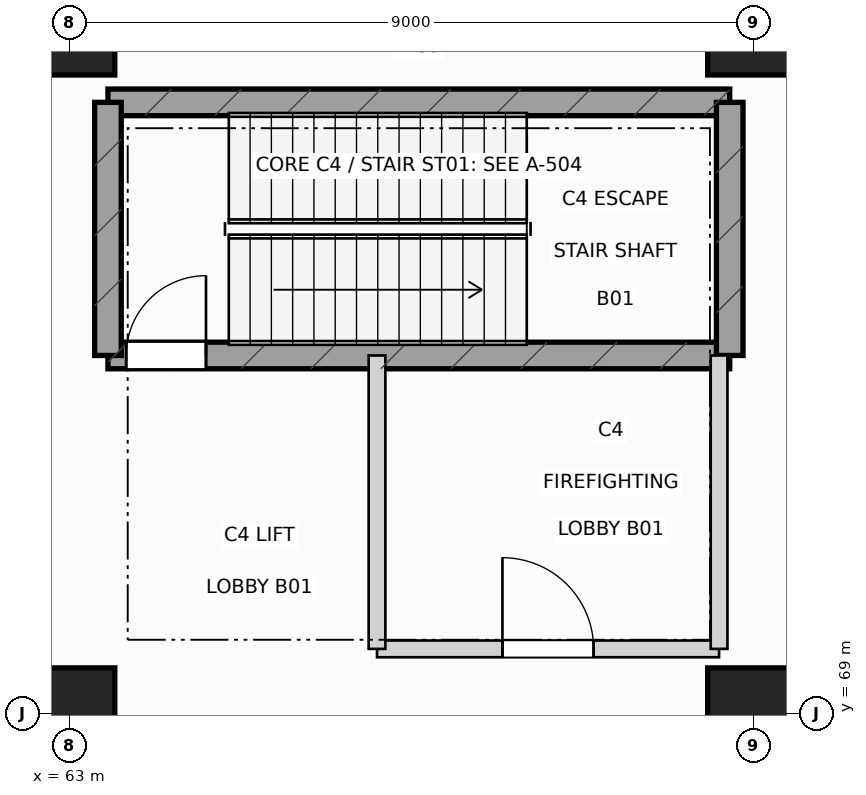
"""IFC4 building model, lengths in metres.
Left out: names, types, materials, properties, quantities, classifications, styles, units other than length and angle.
Written with IfcOpenShell. Run it as: python <this file> out.ifc"""

import sys

from ifc_helpers import new_model, si_unit, direction, frame, frame_2d, origin, origin_2d, place, context, subcontext, project, spatial, rectangle, extrude, element, fill, save


model = new_model("IFC4")
c1 = context("Model", 3, precision=1e-05, world=origin(), true_north=direction((0.0, 1.0)))
c2 = subcontext(c1, "Body", "Model", "MODEL_VIEW")
j1 = project(units=[si_unit("LENGTHUNIT", "METRE"), si_unit("PLANEANGLEUNIT", "RADIAN")], contexts=[c1])
p1 = place(None, origin())
s1 = spatial("IfcSite", under=j1, at=p1, CompositionType="ELEMENT")
p2 = place(p1, origin())
s2 = spatial("IfcBuilding", under=s1, at=p2, CompositionType="ELEMENT")
p3 = place(p2, frame((0.0, 0.0, -5.4)))
s3 = spatial("IfcBuildingStorey", under=s2, at=p3, CompositionType="ELEMENT", Elevation=-5.4)
for number, where, z_axis, x_axis in (
    (1, (63.0, 69.0, 0.0), (0.0, 0.0, 1.0), (1.0, 0.0, 0.0)),
    (2, (63.0, 78.0, 0.0), (0.0, 0.0, 1.0), (1.0, 0.0, 0.0)),
    (3, (72.0, 69.0, 0.0), (0.0, 0.0, 1.0), (1.0, 0.0, 0.0)),
    (4, (72.0, 78.0, 0.0), (0.0, 0.0, 1.0), (1.0, 0.0, 0.0)),
):
    element("IfcColumn", number, at=place(p3, frame(where, z_axis=z_axis, x_axis=x_axis)), inside=s3, PredefinedType="COLUMN", context=c2, shape_type="SweptSolid", body=[
        extrude(rectangle(XDim=1.2, YDim=1.2, at=origin_2d()), origin(), (0.0, 0.0, 1.0), 5.4),
    ])
p4 = place(p3, frame((63.51, 73.71, 0.0), z_axis=(0.0, 0.0, 1.0), x_axis=(1.0, 0.0, 0.0)))
e5 = element("IfcWall", 5, at=p4, inside=s3, PredefinedType="SHEAR", context=c2, shape_type="SweptSolid", body=[
    extrude(rectangle(XDim=8.18, YDim=0.35, at=frame_2d((4.09, 0.0))), origin(), (0.0, 0.0, 1.0), 5.08),
])
p5 = place(p4, frame((0.24, 0.0, 0.0)))
e6 = element("IfcOpeningElement", 6, at=p5, cuts=e5, PredefinedType="OPENING", context=c2, shape_type="SweptSolid", body=[
    extrude(rectangle(XDim=1.05, YDim=2.18, at=frame_2d((0.525, 1.09))), frame((0.0, 0.185, 0.0), z_axis=(0.0, -1.0, 0.0), x_axis=(1.0, 0.0, 0.0)), (0.0, 0.0, 1.0), 0.37),
])
p6 = place(p3, frame((63.51, 77.04, 0.0), z_axis=(0.0, 0.0, 1.0), x_axis=(1.0, 0.0, 0.0)))
e7 = element("IfcWall", 7, at=p6, inside=s3, PredefinedType="SHEAR", context=c2, shape_type="SweptSolid", body=[
    extrude(rectangle(XDim=8.18, YDim=0.35, at=frame_2d((4.09, 0.0))), origin(), (0.0, 0.0, 1.0), 5.08),
])
for number, where, z_axis, x_axis in (
    (8, (63.51, 73.71, 0.0), (0.0, 0.0, 1.0), (0.0, 1.0, 0.0)),
    (9, (71.69, 73.71, 0.0), (0.0, 0.0, 1.0), (0.0, 1.0, 0.0)),
):
    element("IfcWall", number, at=place(p3, frame(where, z_axis=z_axis, x_axis=x_axis)), inside=s3, PredefinedType="SHEAR", context=c2, shape_type="SweptSolid", body=[
        extrude(rectangle(XDim=3.33, YDim=0.35, at=frame_2d((1.665, 0.0))), origin(), (0.0, 0.0, 1.0), 5.08),
    ])
p7 = place(p3, frame((67.05, 69.85, 0.0), z_axis=(0.0, 0.0, 1.0), x_axis=(1.0, 0.0, 0.0)))
e10 = element("IfcWall", 10, at=p7, inside=s3, PredefinedType="PARTITIONING", context=c2, shape_type="SweptSolid", body=[
    extrude(rectangle(XDim=4.5, YDim=0.22, at=frame_2d((2.25, 0.0))), origin(), (0.0, 0.0, 1.0), 4.555),
])
p8 = place(p7, frame((1.65, 0.0, 0.0)))
e11 = element("IfcOpeningElement", 11, at=p8, cuts=e10, PredefinedType="OPENING", context=c2, shape_type="SweptSolid", body=[
    extrude(rectangle(XDim=1.2, YDim=2.18, at=frame_2d((0.6, 1.09))), frame((0.0, 0.12, 0.0), z_axis=(0.0, -1.0, 0.0), x_axis=(1.0, 0.0, 0.0)), (0.0, 0.0, 1.0), 0.24),
])
p9 = place(p3, frame((67.05, 69.85, 0.0), z_axis=(0.0, 0.0, 1.0), x_axis=(0.0, 1.0, 0.0)))
e12 = element("IfcWall", 12, at=p9, inside=s3, PredefinedType="PARTITIONING", context=c2, shape_type="SweptSolid", body=[
    extrude(rectangle(XDim=3.86, YDim=0.22, at=frame_2d((1.93, 0.0))), origin(), (0.0, 0.0, 1.0), 4.685),
])
p10 = place(p3, frame((71.55, 69.85, 0.0), z_axis=(0.0, 0.0, 1.0), x_axis=(0.0, 1.0, 0.0)))
e13 = element("IfcWall", 13, at=p10, inside=s3, PredefinedType="PARTITIONING", context=c2, shape_type="SweptSolid", body=[
    extrude(rectangle(XDim=3.86, YDim=0.22, at=frame_2d((1.93, 0.0))), origin(), (0.0, 0.0, 1.0), 4.555),
])
p11 = place(p5, origin())
e14 = element("IfcDoor", 14, at=p11, inside=s3, OperationType="SINGLE_SWING_RIGHT", PredefinedType="DOOR", context=c2, shape_type="SweptSolid", body=[
    extrude(rectangle(XDim=1.05, YDim=2.18, at=frame_2d((0.525, 1.09))), frame((0.0, 0.025, 0.0), z_axis=(0.0, -1.0, 0.0), x_axis=(1.0, 0.0, 0.0)), (0.0, 0.0, 1.0), 0.05),
])
fill(e6, e14)
p12 = place(p8, origin())
e15 = element("IfcDoor", 15, at=p12, inside=s3, OperationType="SINGLE_SWING_LEFT", PredefinedType="DOOR", context=c2, shape_type="SweptSolid", body=[
    extrude(rectangle(XDim=1.2, YDim=2.18, at=frame_2d((0.6, 1.09))), frame((0.0, 0.025, 0.0), z_axis=(0.0, -1.0, 0.0), x_axis=(1.0, 0.0, 0.0)), (0.0, 0.0, 1.0), 0.05),
])
fill(e11, e15)
save(model, sys.argv[1])
